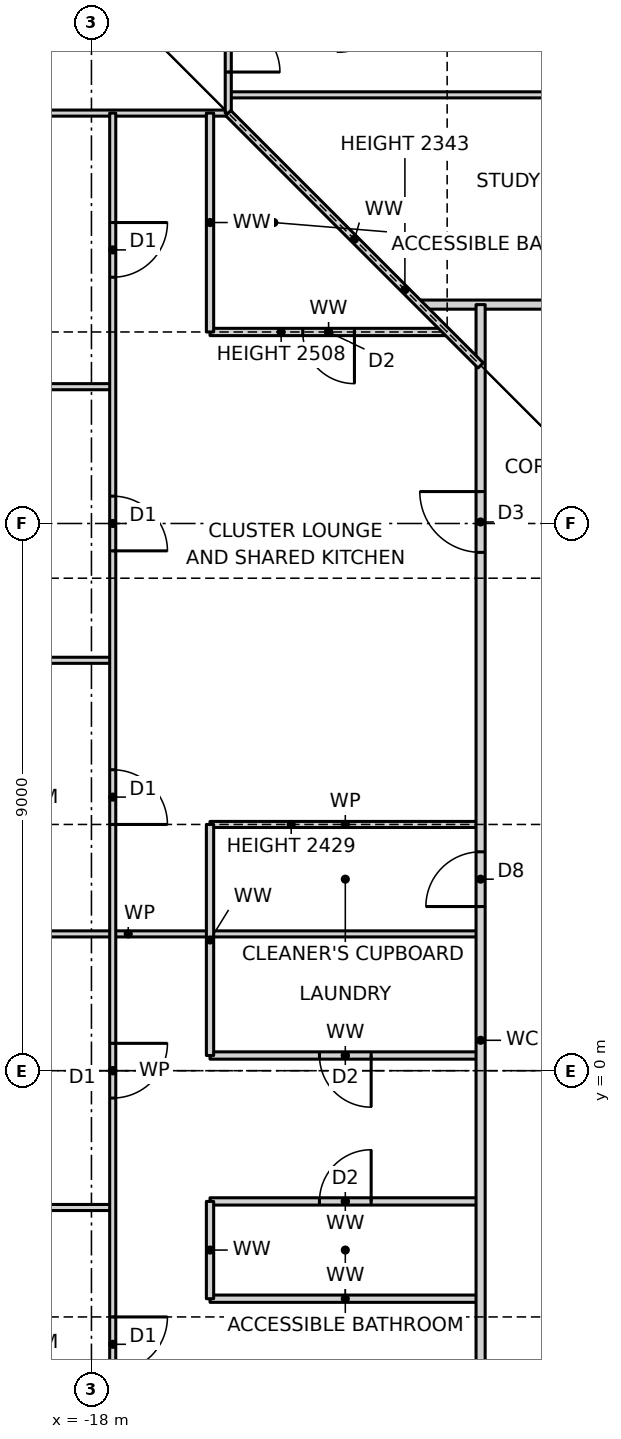
"""IFC4 building model, lengths in metres.
Left out: names, types, materials, properties, quantities, classifications, styles, units other than length and angle.
Written with IfcOpenShell. Run it as: python <this file> out.ifc"""

import sys

from ifc_helpers import new_model, si_unit, direction, frame, frame_2d, origin, place, context, subcontext, project, spatial, rectangle, extrude, element, fill, save


model = new_model("IFC4")
c1 = context("Model", 3, precision=1e-05, world=origin(), true_north=direction((0.0, 1.0)))
c2 = subcontext(c1, "Body", "Model", "MODEL_VIEW")
j1 = project(units=[si_unit("LENGTHUNIT", "METRE"), si_unit("PLANEANGLEUNIT", "RADIAN")], contexts=[c1])
p1 = place(None, origin())
s1 = spatial("IfcSite", under=j1, at=p1, CompositionType="ELEMENT")
p2 = place(p1, origin())
s2 = spatial("IfcBuilding", under=s1, at=p2, CompositionType="ELEMENT")
p3 = place(p2, frame((0.0, 0.0, 57.0)))
s3 = spatial("IfcBuildingStorey", under=s2, at=p3, CompositionType="ELEMENT", Elevation=57.0)
p4 = place(p3, frame((-16.05, -3.75, 0.0), z_axis=(0.0, 0.0, 1.0), x_axis=(1.0, 0.0, 0.0)))
e1 = element("IfcWall", 1, at=p4, inside=s3, PredefinedType="PARTITIONING", context=c2, shape_type="SweptSolid", body=[
    extrude(rectangle(XDim=4.45, YDim=0.12, at=frame_2d((2.225, 0.0))), origin(), (0.0, 0.0, 1.0), 3.27),
])
p5 = place(p3, frame((-23.19, -2.25, 0.0), z_axis=(0.0, 0.0, 1.0), x_axis=(1.0, 0.0, 0.0)))
e2 = element("IfcWall", 2, at=p5, inside=s3, PredefinedType="PARTITIONING", context=c2, shape_type="SweptSolid", body=[
    extrude(rectangle(XDim=5.54, YDim=0.1, at=frame_2d((2.77, 0.0))), origin(), (0.0, 0.0, 1.0), 3.27),
])
p6 = place(p3, frame((-16.05, -2.15, 0.0), z_axis=(0.0, 0.0, 1.0), x_axis=(1.0, 0.0, 0.0)))
e3 = element("IfcWall", 3, at=p6, inside=s3, PredefinedType="PARTITIONING", context=c2, shape_type="SweptSolid", body=[
    extrude(rectangle(XDim=4.45, YDim=0.12, at=frame_2d((2.225, 0.0))), origin(), (0.0, 0.0, 1.0), 3.27),
])
p7 = place(p6, frame((1.8, 0.0, 0.0)))
e4 = element("IfcOpeningElement", 4, at=p7, cuts=e3, PredefinedType="OPENING", context=c2, shape_type="SweptSolid", body=[
    extrude(rectangle(XDim=0.85, YDim=2.1, at=frame_2d((0.425, 1.05))), frame((0.0, 0.07, 0.0), z_axis=(0.0, -1.0, 0.0), x_axis=(1.0, 0.0, 0.0)), (0.0, 0.0, 1.0), 0.14),
])
p8 = place(p3, frame((-16.05, 0.25, 0.0), z_axis=(0.0, 0.0, 1.0), x_axis=(1.0, 0.0, 0.0)))
e5 = element("IfcWall", 5, at=p8, inside=s3, PredefinedType="PARTITIONING", context=c2, shape_type="SweptSolid", body=[
    extrude(rectangle(XDim=4.45, YDim=0.12, at=frame_2d((2.225, 0.0))), origin(), (0.0, 0.0, 1.0), 3.27),
])
p9 = place(p8, frame((1.8, 0.0, 0.0)))
e6 = element("IfcOpeningElement", 6, at=p9, cuts=e5, PredefinedType="OPENING", context=c2, shape_type="SweptSolid", body=[
    extrude(rectangle(XDim=0.85, YDim=2.1, at=frame_2d((0.425, 1.05))), frame((0.0, 0.07, 0.0), z_axis=(0.0, -1.0, 0.0), x_axis=(1.0, 0.0, 0.0)), (0.0, 0.0, 1.0), 0.14),
])
p10 = place(p3, frame((-23.19, 2.25, 0.0), z_axis=(0.0, 0.0, 1.0), x_axis=(1.0, 0.0, 0.0)))
e7 = element("IfcWall", 7, at=p10, inside=s3, PredefinedType="PARTITIONING", context=c2, shape_type="SweptSolid", body=[
    extrude(rectangle(XDim=11.59, YDim=0.1, at=frame_2d((5.795, 0.0))), origin(), (0.0, 0.0, 1.0), 3.27),
])
p11 = place(p3, frame((-16.05, 4.05, 0.0), z_axis=(0.0, 0.0, 1.0), x_axis=(1.0, 0.0, 0.0)))
e8 = element("IfcWall", 8, at=p11, inside=s3, PredefinedType="PARTITIONING", context=c2, shape_type="SweptSolid", body=[
    extrude(rectangle(XDim=4.45, YDim=0.1, at=frame_2d((2.225, 0.0))), origin(), (0.0, 0.0, 1.0), 2.429),
])
for number, where, z_axis, x_axis in (
    (9, (-23.19, 6.75, 0.0), (0.0, 0.0, 1.0), (1.0, 0.0, 0.0)),
    (10, (-23.19, 11.25, 0.0), (0.0, 0.0, 1.0), (1.0, 0.0, 0.0)),
):
    element("IfcWall", number, at=place(p3, frame(where, z_axis=z_axis, x_axis=x_axis)), inside=s3, PredefinedType="PARTITIONING", context=c2, shape_type="SweptSolid", body=[
        extrude(rectangle(XDim=5.54, YDim=0.1, at=frame_2d((2.77, 0.0))), origin(), (0.0, 0.0, 1.0), 3.27),
    ])
p12 = place(p3, frame((-16.05, 12.15, 0.0), z_axis=(0.0, 0.0, 1.0), x_axis=(1.0, 0.0, 0.0)))
e11 = element("IfcWall", 11, at=p12, inside=s3, PredefinedType="PARTITIONING", context=c2, shape_type="SweptSolid", body=[
    extrude(rectangle(XDim=3.9, YDim=0.12, at=frame_2d((1.95, 0.0))), origin(), (0.0, 0.0, 1.0), 2.508),
])
p13 = place(p12, frame((1.525, 0.0, 0.0)))
e12 = element("IfcOpeningElement", 12, at=p13, cuts=e11, PredefinedType="OPENING", context=c2, shape_type="SweptSolid", body=[
    extrude(rectangle(XDim=0.85, YDim=2.1, at=frame_2d((0.425, 1.05))), frame((0.0, 0.07, 0.0), z_axis=(0.0, -1.0, 0.0), x_axis=(1.0, 0.0, 0.0)), (0.0, 0.0, 1.0), 0.14),
])
p14 = place(p3, frame((-12.6, 12.6, 0.0), z_axis=(0.0, 0.0, 1.0), x_axis=(1.0, 0.0, 0.0)))
e13 = element("IfcWall", 13, at=p14, inside=s3, PredefinedType="PARTITIONING", context=c2, shape_type="SweptSolid", body=[
    extrude(rectangle(XDim=25.2, YDim=0.15, at=frame_2d((12.6, 0.0))), origin(), (0.0, 0.0, 1.0), 3.27),
])
p15 = place(p14, frame((11.505, 0.0, 0.0)))
e14 = element("IfcOpeningElement", 14, at=p15, cuts=e13, PredefinedType="OPENING", context=c2, shape_type="SweptSolid", body=[
    extrude(rectangle(XDim=1.0, YDim=2.1, at=frame_2d((0.5, 1.05))), frame((0.0, 0.085, 0.0), z_axis=(0.0, -1.0, 0.0), x_axis=(1.0, 0.0, 0.0)), (0.0, 0.0, 1.0), 0.17),
])
p16 = place(p3, frame((-23.19, 15.75, 0.0), z_axis=(0.0, 0.0, 1.0), x_axis=(1.0, 0.0, 0.0)))
e15 = element("IfcWall", 15, at=p16, inside=s3, PredefinedType="PARTITIONING", context=c2, shape_type="SweptSolid", body=[
    extrude(rectangle(XDim=7.44, YDim=0.1, at=frame_2d((3.72, 0.0))), origin(), (0.0, 0.0, 1.0), 3.27),
])
p17 = place(p3, frame((-15.75, 16.05, 0.0), z_axis=(0.0, 0.0, 1.0), x_axis=(1.0, 0.0, 0.0)))
e16 = element("IfcWall", 16, at=p17, inside=s3, PredefinedType="PARTITIONING", context=c2, shape_type="SweptSolid", body=[
    extrude(rectangle(XDim=11.31, YDim=0.1, at=frame_2d((5.655, 0.0))), origin(), (0.0, 0.0, 1.0), 3.27),
])
p18 = place(p17, frame((5.23, 0.0, 0.0)))
e17 = element("IfcOpeningElement", 17, at=p18, cuts=e16, PredefinedType="OPENING", context=c2, shape_type="SweptSolid", body=[
    extrude(rectangle(XDim=0.85, YDim=2.1, at=frame_2d((0.425, 1.05))), frame((0.0, 0.06, 0.0), z_axis=(0.0, -1.0, 0.0), x_axis=(1.0, 0.0, 0.0)), (0.0, 0.0, 1.0), 0.12),
])
p19 = place(p3, frame((-11.6, -11.6, 0.0), z_axis=(0.0, 0.0, 1.0), x_axis=(0.0, 1.0, 0.0)))
e18 = element("IfcWall", 18, at=p19, inside=s3, PredefinedType="PARTITIONING", context=c2, shape_type="SweptSolid", body=[
    extrude(rectangle(XDim=24.2, YDim=0.15, at=frame_2d((12.1, 0.0))), origin(), (0.0, 0.0, 1.0), 3.27),
])
p20 = place(p19, frame((20.125, 0.0, 0.0)))
e19 = element("IfcOpeningElement", 19, at=p20, cuts=e18, PredefinedType="OPENING", context=c2, shape_type="SweptSolid", body=[
    extrude(rectangle(XDim=1.0, YDim=2.1, at=frame_2d((0.5, 1.05))), frame((0.0, 0.085, 0.0), z_axis=(0.0, -1.0, 0.0), x_axis=(1.0, 0.0, 0.0)), (0.0, 0.0, 1.0), 0.17),
])
p21 = place(p19, frame((14.3, 0.0, 0.0)))
e20 = element("IfcOpeningElement", 20, at=p21, cuts=e18, PredefinedType="OPENING", context=c2, shape_type="SweptSolid", body=[
    extrude(rectangle(XDim=0.9, YDim=2.1, at=frame_2d((0.45, 1.05))), frame((0.0, 0.085, 0.0), z_axis=(0.0, -1.0, 0.0), x_axis=(1.0, 0.0, 0.0)), (0.0, 0.0, 1.0), 0.17),
])
p22 = place(p19, frame((3.425, 0.0, 0.0)))
e21 = element("IfcOpeningElement", 21, at=p22, cuts=e18, PredefinedType="OPENING", context=c2, shape_type="SweptSolid", body=[
    extrude(rectangle(XDim=1.0, YDim=2.1, at=frame_2d((0.5, 1.05))), frame((0.0, 0.085, 0.0), z_axis=(0.0, -1.0, 0.0), x_axis=(1.0, 0.0, 0.0)), (0.0, 0.0, 1.0), 0.17),
])
p23 = place(p3, frame((-15.75, 15.75, 0.0), z_axis=(0.0, 0.0, 1.0), x_axis=(0.0, 1.0, 0.0)))
e22 = element("IfcWall", 22, at=p23, inside=s3, PredefinedType="PARTITIONING", context=c2, shape_type="SweptSolid", body=[
    extrude(rectangle(XDim=7.44, YDim=0.1, at=frame_2d((3.72, 0.0))), origin(), (0.0, 0.0, 1.0), 3.27),
])
p24 = place(p23, frame((0.675, 0.0, 0.0)))
e23 = element("IfcOpeningElement", 23, at=p24, cuts=e22, PredefinedType="OPENING", context=c2, shape_type="SweptSolid", body=[
    extrude(rectangle(XDim=0.85, YDim=2.1, at=frame_2d((0.425, 1.05))), frame((0.0, 0.06, 0.0), z_axis=(0.0, -1.0, 0.0), x_axis=(1.0, 0.0, 0.0)), (0.0, 0.0, 1.0), 0.12),
])
p25 = place(p3, frame((-16.05, -3.75, 0.0), z_axis=(0.0, 0.0, 1.0), x_axis=(0.0, 1.0, 0.0)))
e24 = element("IfcWall", 24, at=p25, inside=s3, PredefinedType="PARTITIONING", context=c2, shape_type="SweptSolid", body=[
    extrude(rectangle(XDim=1.6, YDim=0.12, at=frame_2d((0.8, 0.0))), origin(), (0.0, 0.0, 1.0), 3.27),
])
p26 = place(p3, frame((-16.05, 0.25, 0.0), z_axis=(0.0, 0.0, 1.0), x_axis=(0.0, 1.0, 0.0)))
e25 = element("IfcWall", 25, at=p26, inside=s3, PredefinedType="PARTITIONING", context=c2, shape_type="SweptSolid", body=[
    extrude(rectangle(XDim=3.8, YDim=0.12, at=frame_2d((1.9, 0.0))), origin(), (0.0, 0.0, 1.0), 3.27),
])
p27 = place(p3, frame((-16.05, 12.15, 0.0), z_axis=(0.0, 0.0, 1.0), x_axis=(0.0, 1.0, 0.0)))
e26 = element("IfcWall", 26, at=p27, inside=s3, PredefinedType="PARTITIONING", context=c2, shape_type="SweptSolid", body=[
    extrude(rectangle(XDim=3.6, YDim=0.12, at=frame_2d((1.8, 0.0))), origin(), (0.0, 0.0, 1.0), 3.27),
])
p28 = place(p3, frame((-17.65, -15.75, 0.0), z_axis=(0.0, 0.0, 1.0), x_axis=(0.0, 1.0, 0.0)))
e27 = element("IfcWall", 27, at=p28, inside=s3, PredefinedType="PARTITIONING", context=c2, shape_type="SweptSolid", body=[
    extrude(rectangle(XDim=31.5, YDim=0.1, at=frame_2d((15.75, 0.0))), origin(), (0.0, 0.0, 1.0), 3.27),
])
p29 = place(p28, frame((28.8, 0.0, 0.0)))
e28 = element("IfcOpeningElement", 28, at=p29, cuts=e27, PredefinedType="OPENING", context=c2, shape_type="SweptSolid", body=[
    extrude(rectangle(XDim=0.9, YDim=2.1, at=frame_2d((0.45, 1.05))), frame((0.0, 0.06, 0.0), z_axis=(0.0, -1.0, 0.0), x_axis=(1.0, 0.0, 0.0)), (0.0, 0.0, 1.0), 0.12),
])
p30 = place(p28, frame((24.3, 0.0, 0.0)))
e29 = element("IfcOpeningElement", 29, at=p30, cuts=e27, PredefinedType="OPENING", context=c2, shape_type="SweptSolid", body=[
    extrude(rectangle(XDim=0.9, YDim=2.1, at=frame_2d((0.45, 1.05))), frame((0.0, 0.06, 0.0), z_axis=(0.0, -1.0, 0.0), x_axis=(1.0, 0.0, 0.0)), (0.0, 0.0, 1.0), 0.12),
])
p31 = place(p28, frame((19.8, 0.0, 0.0)))
e30 = element("IfcOpeningElement", 30, at=p31, cuts=e27, PredefinedType="OPENING", context=c2, shape_type="SweptSolid", body=[
    extrude(rectangle(XDim=0.9, YDim=2.1, at=frame_2d((0.45, 1.05))), frame((0.0, 0.06, 0.0), z_axis=(0.0, -1.0, 0.0), x_axis=(1.0, 0.0, 0.0)), (0.0, 0.0, 1.0), 0.12),
])
p32 = place(p28, frame((15.3, 0.0, 0.0)))
e31 = element("IfcOpeningElement", 31, at=p32, cuts=e27, PredefinedType="OPENING", context=c2, shape_type="SweptSolid", body=[
    extrude(rectangle(XDim=0.9, YDim=2.1, at=frame_2d((0.45, 1.05))), frame((0.0, 0.06, 0.0), z_axis=(0.0, -1.0, 0.0), x_axis=(1.0, 0.0, 0.0)), (0.0, 0.0, 1.0), 0.12),
])
p33 = place(p28, frame((10.8, 0.0, 0.0)))
e32 = element("IfcOpeningElement", 32, at=p33, cuts=e27, PredefinedType="OPENING", context=c2, shape_type="SweptSolid", body=[
    extrude(rectangle(XDim=0.9, YDim=2.1, at=frame_2d((0.45, 1.05))), frame((0.0, 0.06, 0.0), z_axis=(0.0, -1.0, 0.0), x_axis=(1.0, 0.0, 0.0)), (0.0, 0.0, 1.0), 0.12),
])
p34 = place(p28, frame((6.3, 0.0, 0.0)))
e33 = element("IfcOpeningElement", 33, at=p34, cuts=e27, PredefinedType="OPENING", context=c2, shape_type="SweptSolid", body=[
    extrude(rectangle(XDim=0.9, YDim=2.1, at=frame_2d((0.45, 1.05))), frame((0.0, 0.06, 0.0), z_axis=(0.0, -1.0, 0.0), x_axis=(1.0, 0.0, 0.0)), (0.0, 0.0, 1.0), 0.12),
])
p35 = place(p28, frame((1.8, 0.0, 0.0)))
e34 = element("IfcOpeningElement", 34, at=p35, cuts=e27, PredefinedType="OPENING", context=c2, shape_type="SweptSolid", body=[
    extrude(rectangle(XDim=0.9, YDim=2.1, at=frame_2d((0.45, 1.05))), frame((0.0, 0.06, 0.0), z_axis=(0.0, -1.0, 0.0), x_axis=(1.0, 0.0, 0.0)), (0.0, 0.0, 1.0), 0.12),
])
p36 = place(p3, frame((-11.6, 11.6, 0.0), z_axis=(0.0, 0.0, 1.0), x_axis=(-0.707106781187, 0.707106781187, 0.0)))
e35 = element("IfcWall", 35, at=p36, inside=s3, PredefinedType="PARTITIONING", context=c2, shape_type="SweptSolid", body=[
    extrude(rectangle(XDim=5.869, YDim=0.12, at=frame_2d((2.935, 0.0))), origin(), (0.0, 0.0, 1.0), 2.343),
])
p37 = place(p29, frame((0.9, 0.0, 0.0), z_axis=(0.0, 0.0, 1.0), x_axis=(-1.0, 0.0, 0.0)))
e36 = element("IfcDoor", 36, at=p37, inside=s3, OperationType="SINGLE_SWING_LEFT", PredefinedType="DOOR", context=c2, shape_type="SweptSolid", body=[
    extrude(rectangle(XDim=0.9, YDim=2.1, at=frame_2d((0.45, 1.05))), frame((0.0, 0.025, 0.0), z_axis=(0.0, -1.0, 0.0), x_axis=(1.0, 0.0, 0.0)), (0.0, 0.0, 1.0), 0.05),
])
fill(e28, e36)
p38 = place(p30, frame((0.9, 0.0, 0.0), z_axis=(0.0, 0.0, 1.0), x_axis=(-1.0, 0.0, 0.0)))
e37 = element("IfcDoor", 37, at=p38, inside=s3, OperationType="SINGLE_SWING_RIGHT", PredefinedType="DOOR", context=c2, shape_type="SweptSolid", body=[
    extrude(rectangle(XDim=0.9, YDim=2.1, at=frame_2d((0.45, 1.05))), frame((0.0, 0.025, 0.0), z_axis=(0.0, -1.0, 0.0), x_axis=(1.0, 0.0, 0.0)), (0.0, 0.0, 1.0), 0.05),
])
fill(e29, e37)
p39 = place(p31, frame((0.9, 0.0, 0.0), z_axis=(0.0, 0.0, 1.0), x_axis=(-1.0, 0.0, 0.0)))
e38 = element("IfcDoor", 38, at=p39, inside=s3, OperationType="SINGLE_SWING_RIGHT", PredefinedType="DOOR", context=c2, shape_type="SweptSolid", body=[
    extrude(rectangle(XDim=0.9, YDim=2.1, at=frame_2d((0.45, 1.05))), frame((0.0, 0.025, 0.0), z_axis=(0.0, -1.0, 0.0), x_axis=(1.0, 0.0, 0.0)), (0.0, 0.0, 1.0), 0.05),
])
fill(e30, e38)
p40 = place(p20, origin())
e39 = element("IfcDoor", 39, at=p40, inside=s3, OperationType="SINGLE_SWING_RIGHT", PredefinedType="DOOR", context=c2, shape_type="SweptSolid", body=[
    extrude(rectangle(XDim=1.0, YDim=2.1, at=frame_2d((0.5, 1.05))), frame((0.0, 0.025, 0.0), z_axis=(0.0, -1.0, 0.0), x_axis=(1.0, 0.0, 0.0)), (0.0, 0.0, 1.0), 0.05),
])
fill(e19, e39)
p41 = place(p13, frame((0.85, 0.0, 0.0), z_axis=(0.0, 0.0, 1.0), x_axis=(-1.0, 0.0, 0.0)))
e40 = element("IfcDoor", 40, at=p41, inside=s3, OperationType="SINGLE_SWING_LEFT", PredefinedType="DOOR", context=c2, shape_type="SweptSolid", body=[
    extrude(rectangle(XDim=0.85, YDim=2.1, at=frame_2d((0.425, 1.05))), frame((0.0, 0.025, 0.0), z_axis=(0.0, -1.0, 0.0), x_axis=(1.0, 0.0, 0.0)), (0.0, 0.0, 1.0), 0.05),
])
fill(e12, e40)
p42 = place(p21, origin())
e41 = element("IfcDoor", 41, at=p42, inside=s3, OperationType="SINGLE_SWING_LEFT", PredefinedType="DOOR", context=c2, shape_type="SweptSolid", body=[
    extrude(rectangle(XDim=0.9, YDim=2.1, at=frame_2d((0.45, 1.05))), frame((0.0, 0.025, 0.0), z_axis=(0.0, -1.0, 0.0), x_axis=(1.0, 0.0, 0.0)), (0.0, 0.0, 1.0), 0.05),
])
fill(e20, e41)
p43 = place(p32, frame((0.9, 0.0, 0.0), z_axis=(0.0, 0.0, 1.0), x_axis=(-1.0, 0.0, 0.0)))
e42 = element("IfcDoor", 42, at=p43, inside=s3, OperationType="SINGLE_SWING_LEFT", PredefinedType="DOOR", context=c2, shape_type="SweptSolid", body=[
    extrude(rectangle(XDim=0.9, YDim=2.1, at=frame_2d((0.45, 1.05))), frame((0.0, 0.025, 0.0), z_axis=(0.0, -1.0, 0.0), x_axis=(1.0, 0.0, 0.0)), (0.0, 0.0, 1.0), 0.05),
])
fill(e31, e42)
p44 = place(p33, frame((0.9, 0.0, 0.0), z_axis=(0.0, 0.0, 1.0), x_axis=(-1.0, 0.0, 0.0)))
e43 = element("IfcDoor", 43, at=p44, inside=s3, OperationType="SINGLE_SWING_LEFT", PredefinedType="DOOR", context=c2, shape_type="SweptSolid", body=[
    extrude(rectangle(XDim=0.9, YDim=2.1, at=frame_2d((0.45, 1.05))), frame((0.0, 0.025, 0.0), z_axis=(0.0, -1.0, 0.0), x_axis=(1.0, 0.0, 0.0)), (0.0, 0.0, 1.0), 0.05),
])
fill(e32, e43)
p45 = place(p9, frame((0.85, 0.0, 0.0), z_axis=(0.0, 0.0, 1.0), x_axis=(-1.0, 0.0, 0.0)))
e44 = element("IfcDoor", 44, at=p45, inside=s3, OperationType="SINGLE_SWING_LEFT", PredefinedType="DOOR", context=c2, shape_type="SweptSolid", body=[
    extrude(rectangle(XDim=0.85, YDim=2.1, at=frame_2d((0.425, 1.05))), frame((0.0, 0.025, 0.0), z_axis=(0.0, -1.0, 0.0), x_axis=(1.0, 0.0, 0.0)), (0.0, 0.0, 1.0), 0.05),
])
fill(e6, e44)
p46 = place(p7, origin())
e45 = element("IfcDoor", 45, at=p46, inside=s3, OperationType="SINGLE_SWING_RIGHT", PredefinedType="DOOR", context=c2, shape_type="SweptSolid", body=[
    extrude(rectangle(XDim=0.85, YDim=2.1, at=frame_2d((0.425, 1.05))), frame((0.0, 0.025, 0.0), z_axis=(0.0, -1.0, 0.0), x_axis=(1.0, 0.0, 0.0)), (0.0, 0.0, 1.0), 0.05),
])
fill(e4, e45)
p47 = place(p24, frame((0.85, 0.0, 0.0), z_axis=(0.0, 0.0, 1.0), x_axis=(-1.0, 0.0, 0.0)))
e46 = element("IfcDoor", 46, at=p47, inside=s3, OperationType="SINGLE_SWING_RIGHT", PredefinedType="DOOR", context=c2, shape_type="SweptSolid", body=[
    extrude(rectangle(XDim=0.85, YDim=2.1, at=frame_2d((0.425, 1.05))), frame((0.0, 0.025, 0.0), z_axis=(0.0, -1.0, 0.0), x_axis=(1.0, 0.0, 0.0)), (0.0, 0.0, 1.0), 0.05),
])
fill(e23, e46)
save(model, sys.argv[1])
